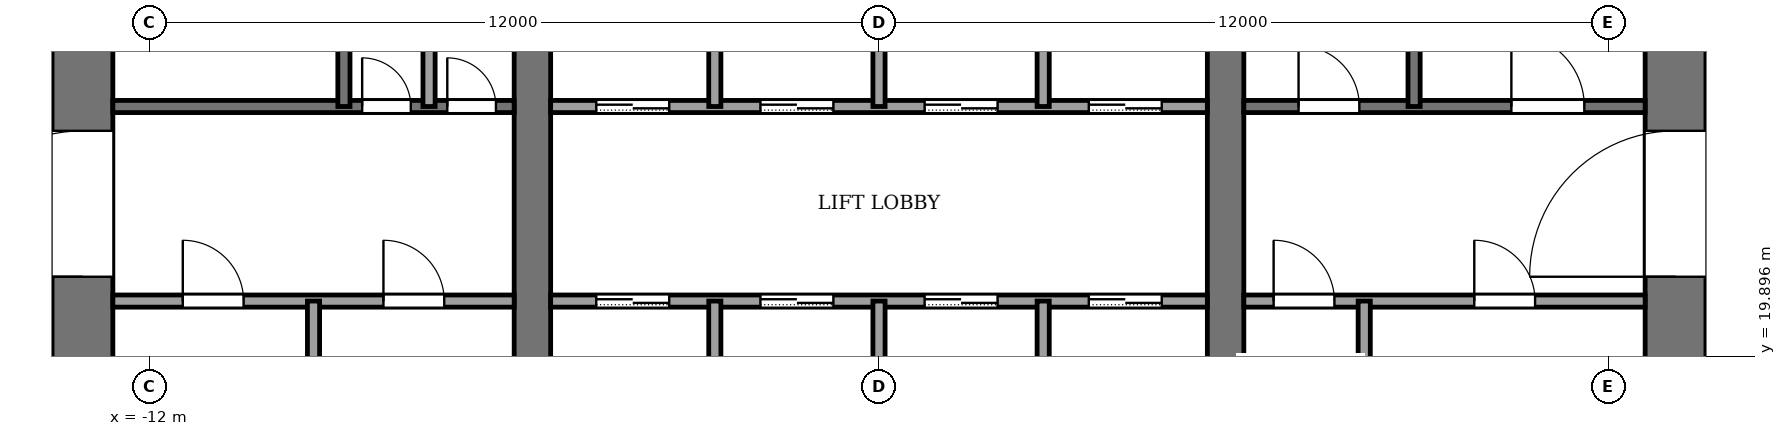
"""IFC4 building model, lengths in metres.
Left out: names, types, materials, properties, quantities, classifications, styles, units other than length and angle.
Written with IfcOpenShell. Run it as: python <this file> out.ifc"""

import sys

from ifc_helpers import new_model, si_unit, direction, frame, frame_2d, origin, place, context, subcontext, project, spatial, rectangle, extrude, element, fill, save


model = new_model("IFC4")
c1 = context("Model", 3, precision=1e-05, world=origin(), true_north=direction((0.0, 1.0)))
c2 = subcontext(c1, "Body", "Model", "MODEL_VIEW")
j1 = project(units=[si_unit("LENGTHUNIT", "METRE"), si_unit("PLANEANGLEUNIT", "RADIAN")], contexts=[c1])
p1 = place(None, origin())
s1 = spatial("IfcSite", under=j1, at=p1, CompositionType="ELEMENT")
p2 = place(p1, origin())
s2 = spatial("IfcBuilding", under=s1, at=p2, CompositionType="ELEMENT")
p3 = place(p2, frame((0.0, 0.0, 162.0)))
s3 = spatial("IfcBuildingStorey", under=s2, at=p3, CompositionType="ELEMENT", Elevation=162.0)
p4 = place(p3, frame((-13.1, 18.4, -0.13), z_axis=(0.0, 0.0, 1.0), x_axis=(0.0, 1.0, 0.0)))
e1 = element("IfcWall", 1, at=p4, inside=s3, PredefinedType="SHEAR", context=c2, shape_type="SweptSolid", body=[
    extrude(rectangle(XDim=19.2, YDim=1.0, at=frame_2d((9.6, 0.0))), origin(), (0.0, 0.0, 1.0), 4.0),
])
p5 = place(p4, frame((2.8, 0.0, 0.13)))
e2 = element("IfcOpeningElement", 2, at=p5, cuts=e1, PredefinedType="OPENING", context=c2, shape_type="SweptSolid", body=[
    extrude(rectangle(XDim=2.4, YDim=2.4, at=frame_2d((1.2, 1.2))), frame((0.0, 0.51, 0.0), z_axis=(0.0, -1.0, 0.0), x_axis=(1.0, 0.0, 0.0)), (0.0, 0.0, 1.0), 1.02),
])
p6 = place(p4, frame((13.4, 0.0, 0.13)))
e3 = element("IfcOpeningElement", 3, at=p6, cuts=e1, PredefinedType="OPENING", context=c2, shape_type="SweptSolid", body=[
    extrude(rectangle(XDim=1.4, YDim=2.2, at=frame_2d((0.7, 1.1))), frame((0.0, 0.51, 0.0), z_axis=(0.0, -1.0, 0.0), x_axis=(1.0, 0.0, 0.0)), (0.0, 0.0, 1.0), 1.02),
])
p7 = place(p3, frame((13.1, 18.4, -0.13), z_axis=(0.0, 0.0, 1.0), x_axis=(0.0, 1.0, 0.0)))
e4 = element("IfcWall", 4, at=p7, inside=s3, PredefinedType="SHEAR", context=c2, shape_type="SweptSolid", body=[
    extrude(rectangle(XDim=19.2, YDim=1.0, at=frame_2d((9.6, 0.0))), origin(), (0.0, 0.0, 1.0), 4.0),
])
p8 = place(p7, frame((2.8, 0.0, 0.13)))
e5 = element("IfcOpeningElement", 5, at=p8, cuts=e4, PredefinedType="OPENING", context=c2, shape_type="SweptSolid", body=[
    extrude(rectangle(XDim=2.4, YDim=2.4, at=frame_2d((1.2, 1.2))), frame((0.0, 0.51, 0.0), z_axis=(0.0, -1.0, 0.0), x_axis=(1.0, 0.0, 0.0)), (0.0, 0.0, 1.0), 1.02),
])
p9 = place(p7, frame((13.3, 0.0, 0.13)))
e6 = element("IfcOpeningElement", 6, at=p9, cuts=e4, PredefinedType="OPENING", context=c2, shape_type="SweptSolid", body=[
    extrude(rectangle(XDim=2.4, YDim=2.4, at=frame_2d((1.2, 1.2))), frame((0.0, 0.51, 0.0), z_axis=(0.0, -1.0, 0.0), x_axis=(1.0, 0.0, 0.0)), (0.0, 0.0, 1.0), 1.02),
])
p10 = place(p3, frame((-5.7, 18.4, -0.13), z_axis=(0.0, 0.0, 1.0), x_axis=(0.0, 1.0, 0.0)))
e7 = element("IfcWall", 7, at=p10, inside=s3, PredefinedType="SHEAR", context=c2, shape_type="SweptSolid", body=[
    extrude(rectangle(XDim=19.2, YDim=0.6, at=frame_2d((9.6, 0.0))), origin(), (0.0, 0.0, 1.0), 4.0),
])
p11 = place(p10, frame((8.35, 0.0, 0.13)))
e8 = element("IfcOpeningElement", 8, at=p11, cuts=e7, PredefinedType="OPENING", context=c2, shape_type="SweptSolid", body=[
    extrude(rectangle(XDim=0.9, YDim=2.1, at=frame_2d((0.45, 1.05))), frame((0.0, 0.31, 0.0), z_axis=(0.0, -1.0, 0.0), x_axis=(1.0, 0.0, 0.0)), (0.0, 0.0, 1.0), 0.62),
])
p12 = place(p3, frame((5.7, 18.4, -0.13), z_axis=(0.0, 0.0, 1.0), x_axis=(0.0, 1.0, 0.0)))
e9 = element("IfcWall", 9, at=p12, inside=s3, PredefinedType="SHEAR", context=c2, shape_type="SweptSolid", body=[
    extrude(rectangle(XDim=19.2, YDim=0.6, at=frame_2d((9.6, 0.0))), origin(), (0.0, 0.0, 1.0), 4.0),
])
p13 = place(p12, frame((8.35, 0.0, 0.13)))
e10 = element("IfcOpeningElement", 10, at=p13, cuts=e9, PredefinedType="OPENING", context=c2, shape_type="SweptSolid", body=[
    extrude(rectangle(XDim=0.9, YDim=2.1, at=frame_2d((0.45, 1.05))), frame((0.0, 0.31, 0.0), z_axis=(0.0, -1.0, 0.0), x_axis=(1.0, 0.0, 0.0)), (0.0, 0.0, 1.0), 0.62),
])
p14 = place(p12, frame((13.3, 0.0, 0.13)))
e11 = element("IfcOpeningElement", 11, at=p14, cuts=e9, PredefinedType="OPENING", context=c2, shape_type="SweptSolid", body=[
    extrude(rectangle(XDim=2.4, YDim=2.4, at=frame_2d((1.2, 1.2))), frame((0.0, 0.31, 0.0), z_axis=(0.0, -1.0, 0.0), x_axis=(1.0, 0.0, 0.0)), (0.0, 0.0, 1.0), 0.62),
])
p15 = place(p3, frame((-12.6, 20.8, 0.0), z_axis=(0.0, 0.0, 1.0), x_axis=(1.0, 0.0, 0.0)))
e12 = element("IfcWall", 12, at=p15, inside=s3, PredefinedType="PARTITIONING", context=c2, shape_type="SweptSolid", body=[
    extrude(rectangle(XDim=6.6, YDim=0.2, at=frame_2d((3.3, 0.0))), origin(), (0.0, 0.0, 1.0), 3.87),
])
p16 = place(p15, frame((1.15, 0.0, 0.0)))
e13 = element("IfcOpeningElement", 13, at=p16, cuts=e12, PredefinedType="OPENING", context=c2, shape_type="SweptSolid", body=[
    extrude(rectangle(XDim=1.0, YDim=2.1, at=frame_2d((0.5, 1.05))), frame((0.0, 0.11, 0.0), z_axis=(0.0, -1.0, 0.0), x_axis=(1.0, 0.0, 0.0)), (0.0, 0.0, 1.0), 0.22),
])
p17 = place(p15, frame((4.45, 0.0, 0.0)))
e14 = element("IfcOpeningElement", 14, at=p17, cuts=e12, PredefinedType="OPENING", context=c2, shape_type="SweptSolid", body=[
    extrude(rectangle(XDim=1.0, YDim=2.1, at=frame_2d((0.5, 1.05))), frame((0.0, 0.11, 0.0), z_axis=(0.0, -1.0, 0.0), x_axis=(1.0, 0.0, 0.0)), (0.0, 0.0, 1.0), 0.22),
])
p18 = place(p3, frame((-5.4, 20.8, 0.0), z_axis=(0.0, 0.0, 1.0), x_axis=(1.0, 0.0, 0.0)))
e15 = element("IfcWall", 15, at=p18, inside=s3, PredefinedType="PARTITIONING", context=c2, shape_type="SweptSolid", body=[
    extrude(rectangle(XDim=10.8, YDim=0.2, at=frame_2d((5.4, 0.0))), origin(), (0.0, 0.0, 1.0), 3.87),
])
p19 = place(p18, frame((0.75, 0.0, 0.0)))
e16 = element("IfcOpeningElement", 16, at=p19, cuts=e15, PredefinedType="OPENING", context=c2, shape_type="SweptSolid", body=[
    extrude(rectangle(XDim=1.2, YDim=2.2, at=frame_2d((0.6, 1.1))), frame((0.0, 0.11, 0.0), z_axis=(0.0, -1.0, 0.0), x_axis=(1.0, 0.0, 0.0)), (0.0, 0.0, 1.0), 0.22),
])
p20 = place(p18, frame((3.45, 0.0, 0.0)))
e17 = element("IfcOpeningElement", 17, at=p20, cuts=e15, PredefinedType="OPENING", context=c2, shape_type="SweptSolid", body=[
    extrude(rectangle(XDim=1.2, YDim=2.2, at=frame_2d((0.6, 1.1))), frame((0.0, 0.11, 0.0), z_axis=(0.0, -1.0, 0.0), x_axis=(1.0, 0.0, 0.0)), (0.0, 0.0, 1.0), 0.22),
])
p21 = place(p18, frame((6.15, 0.0, 0.0)))
e18 = element("IfcOpeningElement", 18, at=p21, cuts=e15, PredefinedType="OPENING", context=c2, shape_type="SweptSolid", body=[
    extrude(rectangle(XDim=1.2, YDim=2.2, at=frame_2d((0.6, 1.1))), frame((0.0, 0.11, 0.0), z_axis=(0.0, -1.0, 0.0), x_axis=(1.0, 0.0, 0.0)), (0.0, 0.0, 1.0), 0.22),
])
p22 = place(p18, frame((8.85, 0.0, 0.0)))
e19 = element("IfcOpeningElement", 19, at=p22, cuts=e15, PredefinedType="OPENING", context=c2, shape_type="SweptSolid", body=[
    extrude(rectangle(XDim=1.2, YDim=2.2, at=frame_2d((0.6, 1.1))), frame((0.0, 0.11, 0.0), z_axis=(0.0, -1.0, 0.0), x_axis=(1.0, 0.0, 0.0)), (0.0, 0.0, 1.0), 0.22),
])
p23 = place(p3, frame((6.0, 20.8, 0.0), z_axis=(0.0, 0.0, 1.0), x_axis=(1.0, 0.0, 0.0)))
e20 = element("IfcWall", 20, at=p23, inside=s3, PredefinedType="PARTITIONING", context=c2, shape_type="SweptSolid", body=[
    extrude(rectangle(XDim=6.6, YDim=0.2, at=frame_2d((3.3, 0.0))), origin(), (0.0, 0.0, 1.0), 3.87),
])
p24 = place(p23, frame((0.49, 0.0, 0.0)))
e21 = element("IfcOpeningElement", 21, at=p24, cuts=e20, PredefinedType="OPENING", context=c2, shape_type="SweptSolid", body=[
    extrude(rectangle(XDim=1.0, YDim=2.1, at=frame_2d((0.5, 1.05))), frame((0.0, 0.11, 0.0), z_axis=(0.0, -1.0, 0.0), x_axis=(1.0, 0.0, 0.0)), (0.0, 0.0, 1.0), 0.22),
])
p25 = place(p23, frame((3.79, 0.0, 0.0)))
e22 = element("IfcOpeningElement", 22, at=p25, cuts=e20, PredefinedType="OPENING", context=c2, shape_type="SweptSolid", body=[
    extrude(rectangle(XDim=1.0, YDim=2.1, at=frame_2d((0.5, 1.05))), frame((0.0, 0.11, 0.0), z_axis=(0.0, -1.0, 0.0), x_axis=(1.0, 0.0, 0.0)), (0.0, 0.0, 1.0), 0.22),
])
p26 = place(p3, frame((-12.6, 24.0, 0.0), z_axis=(0.0, 0.0, 1.0), x_axis=(1.0, 0.0, 0.0)))
e23 = element("IfcWall", 23, at=p26, inside=s3, PredefinedType="PARTITIONING", context=c2, shape_type="SweptSolid", body=[
    extrude(rectangle(XDim=6.6, YDim=0.2, at=frame_2d((3.3, 0.0))), origin(), (0.0, 0.0, 1.0), 3.87),
])
p27 = place(p26, frame((4.1, 0.0, 0.0)))
e24 = element("IfcOpeningElement", 24, at=p27, cuts=e23, PredefinedType="OPENING", context=c2, shape_type="SweptSolid", body=[
    extrude(rectangle(XDim=0.8, YDim=2.1, at=frame_2d((0.4, 1.05))), frame((0.0, 0.11, 0.0), z_axis=(0.0, -1.0, 0.0), x_axis=(1.0, 0.0, 0.0)), (0.0, 0.0, 1.0), 0.22),
])
p28 = place(p26, frame((5.5, 0.0, 0.0)))
e25 = element("IfcOpeningElement", 25, at=p28, cuts=e23, PredefinedType="OPENING", context=c2, shape_type="SweptSolid", body=[
    extrude(rectangle(XDim=0.8, YDim=2.1, at=frame_2d((0.4, 1.05))), frame((0.0, 0.11, 0.0), z_axis=(0.0, -1.0, 0.0), x_axis=(1.0, 0.0, 0.0)), (0.0, 0.0, 1.0), 0.22),
])
p29 = place(p3, frame((-5.4, 24.0, 0.0), z_axis=(0.0, 0.0, 1.0), x_axis=(1.0, 0.0, 0.0)))
e26 = element("IfcWall", 26, at=p29, inside=s3, PredefinedType="PARTITIONING", context=c2, shape_type="SweptSolid", body=[
    extrude(rectangle(XDim=10.8, YDim=0.2, at=frame_2d((5.4, 0.0))), origin(), (0.0, 0.0, 1.0), 3.87),
])
p30 = place(p29, frame((0.75, 0.0, 0.0)))
e27 = element("IfcOpeningElement", 27, at=p30, cuts=e26, PredefinedType="OPENING", context=c2, shape_type="SweptSolid", body=[
    extrude(rectangle(XDim=1.2, YDim=2.2, at=frame_2d((0.6, 1.1))), frame((0.0, 0.11, 0.0), z_axis=(0.0, -1.0, 0.0), x_axis=(1.0, 0.0, 0.0)), (0.0, 0.0, 1.0), 0.22),
])
p31 = place(p29, frame((3.45, 0.0, 0.0)))
e28 = element("IfcOpeningElement", 28, at=p31, cuts=e26, PredefinedType="OPENING", context=c2, shape_type="SweptSolid", body=[
    extrude(rectangle(XDim=1.2, YDim=2.2, at=frame_2d((0.6, 1.1))), frame((0.0, 0.11, 0.0), z_axis=(0.0, -1.0, 0.0), x_axis=(1.0, 0.0, 0.0)), (0.0, 0.0, 1.0), 0.22),
])
p32 = place(p29, frame((6.15, 0.0, 0.0)))
e29 = element("IfcOpeningElement", 29, at=p32, cuts=e26, PredefinedType="OPENING", context=c2, shape_type="SweptSolid", body=[
    extrude(rectangle(XDim=1.2, YDim=2.2, at=frame_2d((0.6, 1.1))), frame((0.0, 0.11, 0.0), z_axis=(0.0, -1.0, 0.0), x_axis=(1.0, 0.0, 0.0)), (0.0, 0.0, 1.0), 0.22),
])
p33 = place(p29, frame((8.85, 0.0, 0.0)))
e30 = element("IfcOpeningElement", 30, at=p33, cuts=e26, PredefinedType="OPENING", context=c2, shape_type="SweptSolid", body=[
    extrude(rectangle(XDim=1.2, YDim=2.2, at=frame_2d((0.6, 1.1))), frame((0.0, 0.11, 0.0), z_axis=(0.0, -1.0, 0.0), x_axis=(1.0, 0.0, 0.0)), (0.0, 0.0, 1.0), 0.22),
])
p34 = place(p3, frame((6.0, 24.0, 0.0), z_axis=(0.0, 0.0, 1.0), x_axis=(1.0, 0.0, 0.0)))
e31 = element("IfcWall", 31, at=p34, inside=s3, PredefinedType="PARTITIONING", context=c2, shape_type="SweptSolid", body=[
    extrude(rectangle(XDim=6.6, YDim=0.2, at=frame_2d((3.3, 0.0))), origin(), (0.0, 0.0, 1.0), 3.87),
])
p35 = place(p34, frame((0.9, 0.0, 0.0)))
e32 = element("IfcOpeningElement", 32, at=p35, cuts=e31, PredefinedType="OPENING", context=c2, shape_type="SweptSolid", body=[
    extrude(rectangle(XDim=1.0, YDim=2.1, at=frame_2d((0.5, 1.05))), frame((0.0, 0.11, 0.0), z_axis=(0.0, -1.0, 0.0), x_axis=(1.0, 0.0, 0.0)), (0.0, 0.0, 1.0), 0.22),
])
p36 = place(p34, frame((4.4, 0.0, 0.0)))
e33 = element("IfcOpeningElement", 33, at=p36, cuts=e31, PredefinedType="OPENING", context=c2, shape_type="SweptSolid", body=[
    extrude(rectangle(XDim=1.2, YDim=2.2, at=frame_2d((0.6, 1.1))), frame((0.0, 0.11, 0.0), z_axis=(0.0, -1.0, 0.0), x_axis=(1.0, 0.0, 0.0)), (0.0, 0.0, 1.0), 0.22),
])
p37 = place(p3, frame((-9.3, 18.4, 0.0), z_axis=(0.0, 0.0, 1.0), x_axis=(0.0, 1.0, 0.0)))
e34 = element("IfcWall", 34, at=p37, inside=s3, PredefinedType="PARTITIONING", context=c2, shape_type="SweptSolid", body=[
    extrude(rectangle(XDim=2.4, YDim=0.2, at=frame_2d((1.2, 0.0))), origin(), (0.0, 0.0, 1.0), 3.87),
])
for number, where, z_axis, x_axis in (
    (35, (-8.8, 24.0, 0.0), (0.0, 0.0, 1.0), (0.0, 1.0, 0.0)),
    (36, (-7.4, 24.0, 0.0), (0.0, 0.0, 1.0), (0.0, 1.0, 0.0)),
):
    element("IfcWall", number, at=place(p3, frame(where, z_axis=z_axis, x_axis=x_axis)), inside=s3, PredefinedType="PARTITIONING", context=c2, shape_type="SweptSolid", body=[
        extrude(rectangle(XDim=7.4, YDim=0.2, at=frame_2d((3.7, 0.0))), origin(), (0.0, 0.0, 1.0), 3.87),
    ])
p38 = place(p3, frame((-2.7, 18.4, 0.0), z_axis=(0.0, 0.0, 1.0), x_axis=(0.0, 1.0, 0.0)))
e37 = element("IfcWall", 37, at=p38, inside=s3, PredefinedType="PARTITIONING", context=c2, shape_type="SweptSolid", body=[
    extrude(rectangle(XDim=2.4, YDim=0.2, at=frame_2d((1.2, 0.0))), origin(), (0.0, 0.0, 1.0), 3.87),
])
p39 = place(p3, frame((-2.7, 24.0, 0.0), z_axis=(0.0, 0.0, 1.0), x_axis=(0.0, 1.0, 0.0)))
e38 = element("IfcWall", 38, at=p39, inside=s3, PredefinedType="PARTITIONING", context=c2, shape_type="SweptSolid", body=[
    extrude(rectangle(XDim=2.4, YDim=0.2, at=frame_2d((1.2, 0.0))), origin(), (0.0, 0.0, 1.0), 3.87),
])
p40 = place(p3, frame((0.0, 18.4, 0.0), z_axis=(0.0, 0.0, 1.0), x_axis=(0.0, 1.0, 0.0)))
e39 = element("IfcWall", 39, at=p40, inside=s3, PredefinedType="PARTITIONING", context=c2, shape_type="SweptSolid", body=[
    extrude(rectangle(XDim=2.4, YDim=0.2, at=frame_2d((1.2, 0.0))), origin(), (0.0, 0.0, 1.0), 3.87),
])
p41 = place(p3, frame((0.0, 24.0, 0.0), z_axis=(0.0, 0.0, 1.0), x_axis=(0.0, 1.0, 0.0)))
e40 = element("IfcWall", 40, at=p41, inside=s3, PredefinedType="PARTITIONING", context=c2, shape_type="SweptSolid", body=[
    extrude(rectangle(XDim=6.4, YDim=0.2, at=frame_2d((3.2, 0.0))), origin(), (0.0, 0.0, 1.0), 3.87),
])
p42 = place(p3, frame((2.7, 18.4, 0.0), z_axis=(0.0, 0.0, 1.0), x_axis=(0.0, 1.0, 0.0)))
e41 = element("IfcWall", 41, at=p42, inside=s3, PredefinedType="PARTITIONING", context=c2, shape_type="SweptSolid", body=[
    extrude(rectangle(XDim=2.4, YDim=0.2, at=frame_2d((1.2, 0.0))), origin(), (0.0, 0.0, 1.0), 3.87),
])
p43 = place(p3, frame((2.7, 24.0, 0.0), z_axis=(0.0, 0.0, 1.0), x_axis=(0.0, 1.0, 0.0)))
e42 = element("IfcWall", 42, at=p43, inside=s3, PredefinedType="PARTITIONING", context=c2, shape_type="SweptSolid", body=[
    extrude(rectangle(XDim=2.4, YDim=0.2, at=frame_2d((1.2, 0.0))), origin(), (0.0, 0.0, 1.0), 3.87),
])
p44 = place(p3, frame((7.98, 18.4, 0.0), z_axis=(0.0, 0.0, 1.0), x_axis=(0.0, 1.0, 0.0)))
e43 = element("IfcWall", 43, at=p44, inside=s3, PredefinedType="PARTITIONING", context=c2, shape_type="SweptSolid", body=[
    extrude(rectangle(XDim=2.4, YDim=0.2, at=frame_2d((1.2, 0.0))), origin(), (0.0, 0.0, 1.0), 3.87),
])
p45 = place(p3, frame((8.8, 24.0, 0.0), z_axis=(0.0, 0.0, 1.0), x_axis=(0.0, 1.0, 0.0)))
e44 = element("IfcWall", 44, at=p45, inside=s3, PredefinedType="PARTITIONING", context=c2, shape_type="SweptSolid", body=[
    extrude(rectangle(XDim=7.4, YDim=0.2, at=frame_2d((3.7, 0.0))), origin(), (0.0, 0.0, 1.0), 3.87),
])
p46 = place(p19, origin())
e45 = element("IfcDoor", 45, at=p46, inside=s3, OperationType="SLIDING_TO_LEFT", PredefinedType="DOOR", context=c2, shape_type="SweptSolid", body=[
    extrude(rectangle(XDim=1.2, YDim=2.2, at=frame_2d((0.6, 1.1))), frame((0.0, 0.025, 0.0), z_axis=(0.0, -1.0, 0.0), x_axis=(1.0, 0.0, 0.0)), (0.0, 0.0, 1.0), 0.05),
])
fill(e16, e45)
p47 = place(p20, origin())
e46 = element("IfcDoor", 46, at=p47, inside=s3, OperationType="SLIDING_TO_LEFT", PredefinedType="DOOR", context=c2, shape_type="SweptSolid", body=[
    extrude(rectangle(XDim=1.2, YDim=2.2, at=frame_2d((0.6, 1.1))), frame((0.0, 0.025, 0.0), z_axis=(0.0, -1.0, 0.0), x_axis=(1.0, 0.0, 0.0)), (0.0, 0.0, 1.0), 0.05),
])
fill(e17, e46)
p48 = place(p21, origin())
e47 = element("IfcDoor", 47, at=p48, inside=s3, OperationType="SLIDING_TO_LEFT", PredefinedType="DOOR", context=c2, shape_type="SweptSolid", body=[
    extrude(rectangle(XDim=1.2, YDim=2.2, at=frame_2d((0.6, 1.1))), frame((0.0, 0.025, 0.0), z_axis=(0.0, -1.0, 0.0), x_axis=(1.0, 0.0, 0.0)), (0.0, 0.0, 1.0), 0.05),
])
fill(e18, e47)
p49 = place(p22, origin())
e48 = element("IfcDoor", 48, at=p49, inside=s3, OperationType="SLIDING_TO_LEFT", PredefinedType="DOOR", context=c2, shape_type="SweptSolid", body=[
    extrude(rectangle(XDim=1.2, YDim=2.2, at=frame_2d((0.6, 1.1))), frame((0.0, 0.025, 0.0), z_axis=(0.0, -1.0, 0.0), x_axis=(1.0, 0.0, 0.0)), (0.0, 0.0, 1.0), 0.05),
])
fill(e19, e48)
p50 = place(p30, origin())
e49 = element("IfcDoor", 49, at=p50, inside=s3, OperationType="SLIDING_TO_LEFT", PredefinedType="DOOR", context=c2, shape_type="SweptSolid", body=[
    extrude(rectangle(XDim=1.2, YDim=2.2, at=frame_2d((0.6, 1.1))), frame((0.0, 0.025, 0.0), z_axis=(0.0, -1.0, 0.0), x_axis=(1.0, 0.0, 0.0)), (0.0, 0.0, 1.0), 0.05),
])
fill(e27, e49)
p51 = place(p31, origin())
e50 = element("IfcDoor", 50, at=p51, inside=s3, OperationType="SLIDING_TO_LEFT", PredefinedType="DOOR", context=c2, shape_type="SweptSolid", body=[
    extrude(rectangle(XDim=1.2, YDim=2.2, at=frame_2d((0.6, 1.1))), frame((0.0, 0.025, 0.0), z_axis=(0.0, -1.0, 0.0), x_axis=(1.0, 0.0, 0.0)), (0.0, 0.0, 1.0), 0.05),
])
fill(e28, e50)
p52 = place(p32, origin())
e51 = element("IfcDoor", 51, at=p52, inside=s3, OperationType="SLIDING_TO_LEFT", PredefinedType="DOOR", context=c2, shape_type="SweptSolid", body=[
    extrude(rectangle(XDim=1.2, YDim=2.2, at=frame_2d((0.6, 1.1))), frame((0.0, 0.025, 0.0), z_axis=(0.0, -1.0, 0.0), x_axis=(1.0, 0.0, 0.0)), (0.0, 0.0, 1.0), 0.05),
])
fill(e29, e51)
p53 = place(p33, origin())
e52 = element("IfcDoor", 52, at=p53, inside=s3, OperationType="SLIDING_TO_LEFT", PredefinedType="DOOR", context=c2, shape_type="SweptSolid", body=[
    extrude(rectangle(XDim=1.2, YDim=2.2, at=frame_2d((0.6, 1.1))), frame((0.0, 0.025, 0.0), z_axis=(0.0, -1.0, 0.0), x_axis=(1.0, 0.0, 0.0)), (0.0, 0.0, 1.0), 0.05),
])
fill(e30, e52)
p54 = place(p16, origin())
e53 = element("IfcDoor", 53, at=p54, inside=s3, OperationType="SINGLE_SWING_LEFT", PredefinedType="DOOR", context=c2, shape_type="SweptSolid", body=[
    extrude(rectangle(XDim=1.0, YDim=2.1, at=frame_2d((0.5, 1.05))), frame((0.0, 0.025, 0.0), z_axis=(0.0, -1.0, 0.0), x_axis=(1.0, 0.0, 0.0)), (0.0, 0.0, 1.0), 0.05),
])
fill(e13, e53)
p55 = place(p17, origin())
e54 = element("IfcDoor", 54, at=p55, inside=s3, OperationType="SINGLE_SWING_LEFT", PredefinedType="DOOR", context=c2, shape_type="SweptSolid", body=[
    extrude(rectangle(XDim=1.0, YDim=2.1, at=frame_2d((0.5, 1.05))), frame((0.0, 0.025, 0.0), z_axis=(0.0, -1.0, 0.0), x_axis=(1.0, 0.0, 0.0)), (0.0, 0.0, 1.0), 0.05),
])
fill(e14, e54)
p56 = place(p24, origin())
e55 = element("IfcDoor", 55, at=p56, inside=s3, OperationType="SINGLE_SWING_RIGHT", PredefinedType="DOOR", context=c2, shape_type="SweptSolid", body=[
    extrude(rectangle(XDim=1.0, YDim=2.1, at=frame_2d((0.5, 1.05))), frame((0.0, 0.025, 0.0), z_axis=(0.0, -1.0, 0.0), x_axis=(1.0, 0.0, 0.0)), (0.0, 0.0, 1.0), 0.05),
])
fill(e21, e55)
p57 = place(p25, origin())
e56 = element("IfcDoor", 56, at=p57, inside=s3, OperationType="SINGLE_SWING_RIGHT", PredefinedType="DOOR", context=c2, shape_type="SweptSolid", body=[
    extrude(rectangle(XDim=1.0, YDim=2.1, at=frame_2d((0.5, 1.05))), frame((0.0, 0.025, 0.0), z_axis=(0.0, -1.0, 0.0), x_axis=(1.0, 0.0, 0.0)), (0.0, 0.0, 1.0), 0.05),
])
fill(e22, e56)
p58 = place(p27, origin())
e57 = element("IfcDoor", 57, at=p58, inside=s3, OperationType="SINGLE_SWING_LEFT", PredefinedType="DOOR", context=c2, shape_type="SweptSolid", body=[
    extrude(rectangle(XDim=0.8, YDim=2.1, at=frame_2d((0.4, 1.05))), frame((0.0, 0.025, 0.0), z_axis=(0.0, -1.0, 0.0), x_axis=(1.0, 0.0, 0.0)), (0.0, 0.0, 1.0), 0.05),
])
fill(e24, e57)
p59 = place(p28, origin())
e58 = element("IfcDoor", 58, at=p59, inside=s3, OperationType="SINGLE_SWING_RIGHT", PredefinedType="DOOR", context=c2, shape_type="SweptSolid", body=[
    extrude(rectangle(XDim=0.8, YDim=2.1, at=frame_2d((0.4, 1.05))), frame((0.0, 0.025, 0.0), z_axis=(0.0, -1.0, 0.0), x_axis=(1.0, 0.0, 0.0)), (0.0, 0.0, 1.0), 0.05),
])
fill(e25, e58)
p60 = place(p35, origin())
e59 = element("IfcDoor", 59, at=p60, inside=s3, OperationType="SINGLE_SWING_RIGHT", PredefinedType="DOOR", context=c2, shape_type="SweptSolid", body=[
    extrude(rectangle(XDim=1.0, YDim=2.1, at=frame_2d((0.5, 1.05))), frame((0.0, 0.025, 0.0), z_axis=(0.0, -1.0, 0.0), x_axis=(1.0, 0.0, 0.0)), (0.0, 0.0, 1.0), 0.05),
])
fill(e32, e59)
p61 = place(p36, origin())
e60 = element("IfcDoor", 60, at=p61, inside=s3, OperationType="SINGLE_SWING_LEFT", PredefinedType="DOOR", context=c2, shape_type="SweptSolid", body=[
    extrude(rectangle(XDim=1.2, YDim=2.2, at=frame_2d((0.6, 1.1))), frame((0.0, 0.025, 0.0), z_axis=(0.0, -1.0, 0.0), x_axis=(1.0, 0.0, 0.0)), (0.0, 0.0, 1.0), 0.05),
])
fill(e33, e60)
p62 = place(p5, origin())
e61 = element("IfcDoor", 61, at=p62, inside=s3, OperationType="DOUBLE_DOOR_SINGLE_SWING", PredefinedType="DOOR", context=c2, shape_type="SweptSolid", body=[
    extrude(rectangle(XDim=2.4, YDim=2.4, at=frame_2d((1.2, 1.2))), frame((0.0, 0.025, 0.0), z_axis=(0.0, -1.0, 0.0), x_axis=(1.0, 0.0, 0.0)), (0.0, 0.0, 1.0), 0.05),
])
fill(e2, e61)
p63 = place(p8, origin())
e62 = element("IfcDoor", 62, at=p63, inside=s3, OperationType="DOUBLE_DOOR_SINGLE_SWING", PredefinedType="DOOR", context=c2, shape_type="SweptSolid", body=[
    extrude(rectangle(XDim=2.4, YDim=2.4, at=frame_2d((1.2, 1.2))), frame((0.0, 0.025, 0.0), z_axis=(0.0, -1.0, 0.0), x_axis=(1.0, 0.0, 0.0)), (0.0, 0.0, 1.0), 0.05),
])
fill(e5, e62)
save(model, sys.argv[1])
